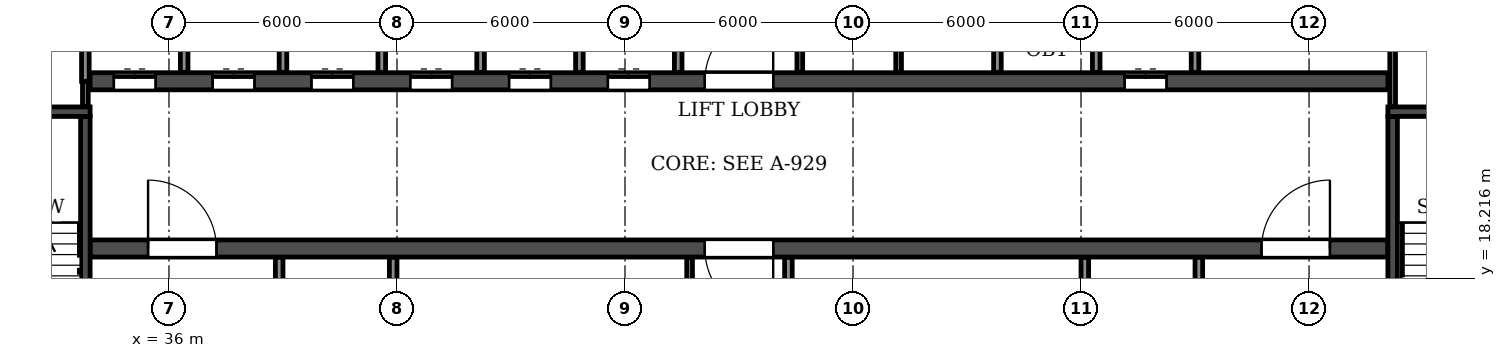
"""IFC4 building model, lengths in metres.
Left out: names, types, materials, properties, quantities, classifications, styles, units other than length and angle.
Written with IfcOpenShell. Run it as: python <this file> out.ifc"""

import sys

from ifc_helpers import new_model, si_unit, direction, frame, frame_2d, origin, place, context, subcontext, project, spatial, rectangle, extrude, element, fill, save


model = new_model("IFC4")
c1 = context("Model", 3, precision=1e-05, world=origin(), true_north=direction((0.0, 1.0)))
c2 = subcontext(c1, "Body", "Model", "MODEL_VIEW")
j1 = project(units=[si_unit("LENGTHUNIT", "METRE"), si_unit("PLANEANGLEUNIT", "RADIAN")], contexts=[c1])
p1 = place(None, origin())
s1 = spatial("IfcSite", under=j1, at=p1, CompositionType="ELEMENT")
p2 = place(p1, origin())
s2 = spatial("IfcBuilding", under=s1, at=p2, CompositionType="ELEMENT")
p3 = place(p2, frame((0.0, 0.0, 158.7)))
s3 = spatial("IfcBuildingStorey", under=s2, at=p3, CompositionType="ELEMENT", Elevation=158.7)
p4 = place(p3, frame((33.925, 19.0, 0.0), z_axis=(0.0, 0.0, 1.0), x_axis=(1.0, 0.0, 0.0)))
e1 = element("IfcWall", 1, at=p4, inside=s3, PredefinedType="SOLIDWALL", context=c2, shape_type="SweptSolid", body=[
    extrude(rectangle(XDim=34.15, YDim=0.45, at=frame_2d((17.075, 0.0))), origin(), (0.0, 0.0, 1.0), 3.07),
])
p5 = place(p4, frame((16.175, 0.0, 0.0)))
e2 = element("IfcOpeningElement", 2, at=p5, cuts=e1, PredefinedType="OPENING", context=c2, shape_type="SweptSolid", body=[
    extrude(rectangle(XDim=1.8, YDim=2.1, at=frame_2d((0.9, 1.05))), frame((0.0, 0.235, 0.0), z_axis=(0.0, -1.0, 0.0), x_axis=(1.0, 0.0, 0.0)), (0.0, 0.0, 1.0), 0.47),
])
p6 = place(p4, frame((1.525, 0.0, 0.0)))
e3 = element("IfcOpeningElement", 3, at=p6, cuts=e1, PredefinedType="OPENING", context=c2, shape_type="SweptSolid", body=[
    extrude(rectangle(XDim=1.8, YDim=2.1, at=frame_2d((0.9, 1.05))), frame((0.0, 0.235, 0.0), z_axis=(0.0, -1.0, 0.0), x_axis=(1.0, 0.0, 0.0)), (0.0, 0.0, 1.0), 0.47),
])
p7 = place(p4, frame((30.825, 0.0, 0.0)))
e4 = element("IfcOpeningElement", 4, at=p7, cuts=e1, PredefinedType="OPENING", context=c2, shape_type="SweptSolid", body=[
    extrude(rectangle(XDim=1.8, YDim=2.1, at=frame_2d((0.9, 1.05))), frame((0.0, 0.235, 0.0), z_axis=(0.0, -1.0, 0.0), x_axis=(1.0, 0.0, 0.0)), (0.0, 0.0, 1.0), 0.47),
])
p8 = place(p3, frame((33.925, 23.4, 0.0), z_axis=(0.0, 0.0, 1.0), x_axis=(1.0, 0.0, 0.0)))
e5 = element("IfcWall", 5, at=p8, inside=s3, PredefinedType="SOLIDWALL", context=c2, shape_type="SweptSolid", body=[
    extrude(rectangle(XDim=34.15, YDim=0.45, at=frame_2d((17.075, 0.0))), origin(), (0.0, 0.0, 1.0), 3.07),
])
p9 = place(p8, frame((16.175, 0.0, 0.0)))
e6 = element("IfcOpeningElement", 6, at=p9, cuts=e5, PredefinedType="OPENING", context=c2, shape_type="SweptSolid", body=[
    extrude(rectangle(XDim=1.8, YDim=2.1, at=frame_2d((0.9, 1.05))), frame((0.0, 0.235, 0.0), z_axis=(0.0, -1.0, 0.0), x_axis=(1.0, 0.0, 0.0)), (0.0, 0.0, 1.0), 0.47),
])
p10 = place(p8, frame((0.625, 0.0, 0.0)))
e7 = element("IfcOpeningElement", 7, at=p10, cuts=e5, PredefinedType="OPENING", context=c2, shape_type="SweptSolid", body=[
    extrude(rectangle(XDim=1.1, YDim=2.1, at=frame_2d((0.55, 1.05))), frame((0.0, 0.235, 0.0), z_axis=(0.0, -1.0, 0.0), x_axis=(1.0, 0.0, 0.0)), (0.0, 0.0, 1.0), 0.47),
])
p11 = place(p8, frame((3.225, 0.0, 0.0)))
e8 = element("IfcOpeningElement", 8, at=p11, cuts=e5, PredefinedType="OPENING", context=c2, shape_type="SweptSolid", body=[
    extrude(rectangle(XDim=1.1, YDim=2.1, at=frame_2d((0.55, 1.05))), frame((0.0, 0.235, 0.0), z_axis=(0.0, -1.0, 0.0), x_axis=(1.0, 0.0, 0.0)), (0.0, 0.0, 1.0), 0.47),
])
p12 = place(p8, frame((5.825, 0.0, 0.0)))
e9 = element("IfcOpeningElement", 9, at=p12, cuts=e5, PredefinedType="OPENING", context=c2, shape_type="SweptSolid", body=[
    extrude(rectangle(XDim=1.1, YDim=2.1, at=frame_2d((0.55, 1.05))), frame((0.0, 0.235, 0.0), z_axis=(0.0, -1.0, 0.0), x_axis=(1.0, 0.0, 0.0)), (0.0, 0.0, 1.0), 0.47),
])
p13 = place(p8, frame((8.425, 0.0, 0.0)))
e10 = element("IfcOpeningElement", 10, at=p13, cuts=e5, PredefinedType="OPENING", context=c2, shape_type="SweptSolid", body=[
    extrude(rectangle(XDim=1.1, YDim=2.1, at=frame_2d((0.55, 1.05))), frame((0.0, 0.235, 0.0), z_axis=(0.0, -1.0, 0.0), x_axis=(1.0, 0.0, 0.0)), (0.0, 0.0, 1.0), 0.47),
])
p14 = place(p8, frame((11.025, 0.0, 0.0)))
e11 = element("IfcOpeningElement", 11, at=p14, cuts=e5, PredefinedType="OPENING", context=c2, shape_type="SweptSolid", body=[
    extrude(rectangle(XDim=1.1, YDim=2.1, at=frame_2d((0.55, 1.05))), frame((0.0, 0.235, 0.0), z_axis=(0.0, -1.0, 0.0), x_axis=(1.0, 0.0, 0.0)), (0.0, 0.0, 1.0), 0.47),
])
p15 = place(p8, frame((13.625, 0.0, 0.0)))
e12 = element("IfcOpeningElement", 12, at=p15, cuts=e5, PredefinedType="OPENING", context=c2, shape_type="SweptSolid", body=[
    extrude(rectangle(XDim=1.1, YDim=2.1, at=frame_2d((0.55, 1.05))), frame((0.0, 0.235, 0.0), z_axis=(0.0, -1.0, 0.0), x_axis=(1.0, 0.0, 0.0)), (0.0, 0.0, 1.0), 0.47),
])
p16 = place(p8, frame((27.225, 0.0, 0.0)))
e13 = element("IfcOpeningElement", 13, at=p16, cuts=e5, PredefinedType="OPENING", context=c2, shape_type="SweptSolid", body=[
    extrude(rectangle(XDim=1.1, YDim=2.1, at=frame_2d((0.55, 1.05))), frame((0.0, 0.235, 0.0), z_axis=(0.0, -1.0, 0.0), x_axis=(1.0, 0.0, 0.0)), (0.0, 0.0, 1.0), 0.47),
])
p17 = place(p3, frame((33.8, 14.825, 0.0), z_axis=(0.0, 0.0, 1.0), x_axis=(0.0, 1.0, 0.0)))
e14 = element("IfcWall", 14, at=p17, inside=s3, PredefinedType="SOLIDWALL", context=c2, shape_type="SweptSolid", body=[
    extrude(rectangle(XDim=7.65, YDim=0.25, at=frame_2d((3.825, 0.0))), origin(), (0.0, 0.0, 1.0), 3.07),
])
p18 = place(p17, frame((0.475, 0.0, 0.0)))
e15 = element("IfcOpeningElement", 15, at=p18, cuts=e14, PredefinedType="OPENING", context=c2, shape_type="SweptSolid", body=[
    extrude(rectangle(XDim=1.0, YDim=2.1, at=frame_2d((0.5, 1.05))), frame((0.0, 0.135, 0.0), z_axis=(0.0, -1.0, 0.0), x_axis=(1.0, 0.0, 0.0)), (0.0, 0.0, 1.0), 0.27),
])
p19 = place(p3, frame((29.875, 22.6, 0.0), z_axis=(0.0, 0.0, 1.0), x_axis=(1.0, 0.0, 0.0)))
e16 = element("IfcWall", 16, at=p19, inside=s3, PredefinedType="SOLIDWALL", context=c2, shape_type="SweptSolid", body=[
    extrude(rectangle(XDim=4.05, YDim=0.25, at=frame_2d((2.025, 0.0))), origin(), (0.0, 0.0, 1.0), 3.07),
])
p20 = place(p3, frame((68.2, 14.825, 0.0), z_axis=(0.0, 0.0, 1.0), x_axis=(0.0, 1.0, 0.0)))
e17 = element("IfcWall", 17, at=p20, inside=s3, PredefinedType="SOLIDWALL", context=c2, shape_type="SweptSolid", body=[
    extrude(rectangle(XDim=7.65, YDim=0.25, at=frame_2d((3.825, 0.0))), origin(), (0.0, 0.0, 1.0), 3.07),
])
p21 = place(p20, frame((0.475, 0.0, 0.0)))
e18 = element("IfcOpeningElement", 18, at=p21, cuts=e17, PredefinedType="OPENING", context=c2, shape_type="SweptSolid", body=[
    extrude(rectangle(XDim=1.0, YDim=2.1, at=frame_2d((0.5, 1.05))), frame((0.0, 0.135, 0.0), z_axis=(0.0, -1.0, 0.0), x_axis=(1.0, 0.0, 0.0)), (0.0, 0.0, 1.0), 0.27),
])
p22 = place(p3, frame((68.075, 22.6, 0.0), z_axis=(0.0, 0.0, 1.0), x_axis=(1.0, 0.0, 0.0)))
e19 = element("IfcWall", 19, at=p22, inside=s3, PredefinedType="SOLIDWALL", context=c2, shape_type="SweptSolid", body=[
    extrude(rectangle(XDim=4.05, YDim=0.25, at=frame_2d((2.025, 0.0))), origin(), (0.0, 0.0, 1.0), 3.07),
])
for number, where, z_axis, x_axis in (
    (20, (49.7, 14.835, 0.0), (0.0, 0.0, 1.0), (0.0, 1.0, 0.0)),
    (21, (52.6, 23.635, 0.0), (0.0, 0.0, 1.0), (0.0, 1.0, 0.0)),
    (22, (55.2, 23.635, 0.0), (0.0, 0.0, 1.0), (0.0, 1.0, 0.0)),
):
    element("IfcWall", number, at=place(p3, frame(where, z_axis=z_axis, x_axis=x_axis)), inside=s3, PredefinedType="PARTITIONING", context=c2, shape_type="SweptSolid", body=[
        extrude(rectangle(XDim=3.93, YDim=0.15, at=frame_2d((1.965, 0.0))), origin(), (0.0, 0.0, 1.0), 3.07),
    ])
p23 = place(p3, frame((52.3, 14.835, 0.0), z_axis=(0.0, 0.0, 1.0), x_axis=(0.0, 1.0, 0.0)))
e23 = element("IfcWall", 23, at=p23, inside=s3, PredefinedType="PARTITIONING", context=c2, shape_type="SweptSolid", body=[
    extrude(rectangle(XDim=3.93, YDim=0.2, at=frame_2d((1.965, 0.0))), origin(), (0.0, 0.0, 1.0), 3.07),
])
p24 = place(p3, frame((33.8, 22.735, 0.0), z_axis=(0.0, 0.0, 1.0), x_axis=(0.0, 1.0, 0.0)))
e24 = element("IfcWall", 24, at=p24, inside=s3, PredefinedType="PARTITIONING", context=c2, shape_type="SweptSolid", body=[
    extrude(rectangle(XDim=0.665, YDim=0.15, at=frame_2d((0.333, 0.0))), origin(), (0.0, 0.0, 1.0), 3.07),
])
p25 = place(p3, frame((68.2, 22.735, 0.0), z_axis=(0.0, 0.0, 1.0), x_axis=(0.0, 1.0, 0.0)))
e25 = element("IfcWall", 25, at=p25, inside=s3, PredefinedType="PARTITIONING", context=c2, shape_type="SweptSolid", body=[
    extrude(rectangle(XDim=4.83, YDim=0.15, at=frame_2d((2.415, 0.0))), origin(), (0.0, 0.0, 1.0), 3.07),
])
p26 = place(p3, frame((33.8, 23.4, 0.0), z_axis=(0.0, 0.0, 1.0), x_axis=(0.0, 1.0, 0.0)))
e26 = element("IfcWall", 26, at=p26, inside=s3, PredefinedType="PARTITIONING", context=c2, shape_type="SweptSolid", body=[
    extrude(rectangle(XDim=2.7, YDim=0.2, at=frame_2d((1.35, 0.0))), origin(), (0.0, 0.0, 1.0), 3.07),
])
p27 = place(p3, frame((36.4, 23.635, 0.0), z_axis=(0.0, 0.0, 1.0), x_axis=(0.0, 1.0, 0.0)))
e27 = element("IfcWall", 27, at=p27, inside=s3, PredefinedType="PARTITIONING", context=c2, shape_type="SweptSolid", body=[
    extrude(rectangle(XDim=2.465, YDim=0.2, at=frame_2d((1.232, 0.0))), origin(), (0.0, 0.0, 1.0), 3.07),
])
p28 = place(p3, frame((38.9, 14.835, 0.0), z_axis=(0.0, 0.0, 1.0), x_axis=(0.0, 1.0, 0.0)))
e28 = element("IfcWall", 28, at=p28, inside=s3, PredefinedType="PARTITIONING", context=c2, shape_type="SweptSolid", body=[
    extrude(rectangle(XDim=3.93, YDim=0.2, at=frame_2d((1.965, 0.0))), origin(), (0.0, 0.0, 1.0), 3.07),
])
p29 = place(p28, frame((1.415, 0.0, 0.0)))
e29 = element("IfcOpeningElement", 29, at=p29, cuts=e28, PredefinedType="OPENING", context=c2, shape_type="SweptSolid", body=[
    extrude(rectangle(XDim=1.1, YDim=2.1, at=frame_2d((0.55, 1.05))), frame((0.0, 0.11, 0.0), z_axis=(0.0, -1.0, 0.0), x_axis=(1.0, 0.0, 0.0)), (0.0, 0.0, 1.0), 0.22),
])
for number, where, z_axis, x_axis in (
    (30, (39.0, 23.635, 0.0), (0.0, 0.0, 1.0), (0.0, 1.0, 0.0)),
    (31, (41.6, 23.635, 0.0), (0.0, 0.0, 1.0), (0.0, 1.0, 0.0)),
):
    element("IfcWall", number, at=place(p3, frame(where, z_axis=z_axis, x_axis=x_axis)), inside=s3, PredefinedType="PARTITIONING", context=c2, shape_type="SweptSolid", body=[
        extrude(rectangle(XDim=2.465, YDim=0.2, at=frame_2d((1.232, 0.0))), origin(), (0.0, 0.0, 1.0), 3.07),
    ])
for number, where, z_axis, x_axis in (
    (32, (41.9, 14.835, 0.0), (0.0, 0.0, 1.0), (0.0, 1.0, 0.0)),
    (33, (44.2, 23.635, 0.0), (0.0, 0.0, 1.0), (0.0, 1.0, 0.0)),
    (34, (46.8, 23.635, 0.0), (0.0, 0.0, 1.0), (0.0, 1.0, 0.0)),
):
    element("IfcWall", number, at=place(p3, frame(where, z_axis=z_axis, x_axis=x_axis)), inside=s3, PredefinedType="PARTITIONING", context=c2, shape_type="SweptSolid", body=[
        extrude(rectangle(XDim=3.93, YDim=0.2, at=frame_2d((1.965, 0.0))), origin(), (0.0, 0.0, 1.0), 3.07),
    ])
for number, where, z_axis, x_axis in (
    (35, (49.4, 23.635, 0.0), (0.0, 0.0, 1.0), (0.0, 1.0, 0.0)),
    (36, (57.8, 23.635, 0.0), (0.0, 0.0, 1.0), (0.0, 1.0, 0.0)),
):
    element("IfcWall", number, at=place(p3, frame(where, z_axis=z_axis, x_axis=x_axis)), inside=s3, PredefinedType="PARTITIONING", context=c2, shape_type="SweptSolid", body=[
        extrude(rectangle(XDim=2.465, YDim=0.2, at=frame_2d((1.232, 0.0))), origin(), (0.0, 0.0, 1.0), 3.07),
    ])
p30 = place(p3, frame((60.1, 14.835, 0.0), z_axis=(0.0, 0.0, 1.0), x_axis=(0.0, 1.0, 0.0)))
e37 = element("IfcWall", 37, at=p30, inside=s3, PredefinedType="PARTITIONING", context=c2, shape_type="SweptSolid", body=[
    extrude(rectangle(XDim=3.93, YDim=0.2, at=frame_2d((1.965, 0.0))), origin(), (0.0, 0.0, 1.0), 3.07),
])
for number, where, z_axis, x_axis in (
    (38, (60.4, 23.635, 0.0), (0.0, 0.0, 1.0), (0.0, 1.0, 0.0)),
    (39, (63.0, 23.635, 0.0), (0.0, 0.0, 1.0), (0.0, 1.0, 0.0)),
):
    element("IfcWall", number, at=place(p3, frame(where, z_axis=z_axis, x_axis=x_axis)), inside=s3, PredefinedType="PARTITIONING", context=c2, shape_type="SweptSolid", body=[
        extrude(rectangle(XDim=2.465, YDim=0.2, at=frame_2d((1.232, 0.0))), origin(), (0.0, 0.0, 1.0), 3.07),
    ])
p31 = place(p3, frame((63.1, 14.835, 0.0), z_axis=(0.0, 0.0, 1.0), x_axis=(0.0, 1.0, 0.0)))
e40 = element("IfcWall", 40, at=p31, inside=s3, PredefinedType="PARTITIONING", context=c2, shape_type="SweptSolid", body=[
    extrude(rectangle(XDim=3.93, YDim=0.2, at=frame_2d((1.965, 0.0))), origin(), (0.0, 0.0, 1.0), 3.07),
])
p32 = place(p31, frame((1.415, 0.0, 0.0)))
e41 = element("IfcOpeningElement", 41, at=p32, cuts=e40, PredefinedType="OPENING", context=c2, shape_type="SweptSolid", body=[
    extrude(rectangle(XDim=1.1, YDim=2.1, at=frame_2d((0.55, 1.05))), frame((0.0, 0.11, 0.0), z_axis=(0.0, -1.0, 0.0), x_axis=(1.0, 0.0, 0.0)), (0.0, 0.0, 1.0), 0.22),
])
p33 = place(p9, origin())
e42 = element("IfcDoor", 42, at=p33, inside=s3, OperationType="DOUBLE_DOOR_SINGLE_SWING", PredefinedType="DOOR", context=c2, shape_type="SweptSolid", body=[
    extrude(rectangle(XDim=1.8, YDim=2.1, at=frame_2d((0.9, 1.05))), frame((0.0, 0.025, 0.0), z_axis=(0.0, -1.0, 0.0), x_axis=(1.0, 0.0, 0.0)), (0.0, 0.0, 1.0), 0.05),
])
fill(e6, e42)
p34 = place(p5, frame((1.8, 0.0, 0.0), z_axis=(0.0, 0.0, 1.0), x_axis=(-1.0, 0.0, 0.0)))
e43 = element("IfcDoor", 43, at=p34, inside=s3, OperationType="DOUBLE_DOOR_SINGLE_SWING", PredefinedType="DOOR", context=c2, shape_type="SweptSolid", body=[
    extrude(rectangle(XDim=1.8, YDim=2.1, at=frame_2d((0.9, 1.05))), frame((0.0, 0.025, 0.0), z_axis=(0.0, -1.0, 0.0), x_axis=(1.0, 0.0, 0.0)), (0.0, 0.0, 1.0), 0.05),
])
fill(e2, e43)
p35 = place(p10, origin())
e44 = element("IfcDoor", 44, at=p35, inside=s3, OperationType="DOUBLE_DOOR_SLIDING", PredefinedType="DOOR", context=c2, shape_type="SweptSolid", body=[
    extrude(rectangle(XDim=1.1, YDim=2.1, at=frame_2d((0.55, 1.05))), frame((0.0, 0.025, 0.0), z_axis=(0.0, -1.0, 0.0), x_axis=(1.0, 0.0, 0.0)), (0.0, 0.0, 1.0), 0.05),
])
fill(e7, e44)
p36 = place(p6, origin())
e45 = element("IfcDoor", 45, at=p36, inside=s3, OperationType="DOUBLE_DOOR_SINGLE_SWING", PredefinedType="DOOR", context=c2, shape_type="SweptSolid", body=[
    extrude(rectangle(XDim=1.8, YDim=2.1, at=frame_2d((0.9, 1.05))), frame((0.0, 0.025, 0.0), z_axis=(0.0, -1.0, 0.0), x_axis=(1.0, 0.0, 0.0)), (0.0, 0.0, 1.0), 0.05),
])
fill(e3, e45)
p37 = place(p11, origin())
e46 = element("IfcDoor", 46, at=p37, inside=s3, OperationType="DOUBLE_DOOR_SLIDING", PredefinedType="DOOR", context=c2, shape_type="SweptSolid", body=[
    extrude(rectangle(XDim=1.1, YDim=2.1, at=frame_2d((0.55, 1.05))), frame((0.0, 0.025, 0.0), z_axis=(0.0, -1.0, 0.0), x_axis=(1.0, 0.0, 0.0)), (0.0, 0.0, 1.0), 0.05),
])
fill(e8, e46)
p38 = place(p12, origin())
e47 = element("IfcDoor", 47, at=p38, inside=s3, OperationType="DOUBLE_DOOR_SLIDING", PredefinedType="DOOR", context=c2, shape_type="SweptSolid", body=[
    extrude(rectangle(XDim=1.1, YDim=2.1, at=frame_2d((0.55, 1.05))), frame((0.0, 0.025, 0.0), z_axis=(0.0, -1.0, 0.0), x_axis=(1.0, 0.0, 0.0)), (0.0, 0.0, 1.0), 0.05),
])
fill(e9, e47)
p39 = place(p13, origin())
e48 = element("IfcDoor", 48, at=p39, inside=s3, OperationType="DOUBLE_DOOR_SLIDING", PredefinedType="DOOR", context=c2, shape_type="SweptSolid", body=[
    extrude(rectangle(XDim=1.1, YDim=2.1, at=frame_2d((0.55, 1.05))), frame((0.0, 0.025, 0.0), z_axis=(0.0, -1.0, 0.0), x_axis=(1.0, 0.0, 0.0)), (0.0, 0.0, 1.0), 0.05),
])
fill(e10, e48)
p40 = place(p14, origin())
e49 = element("IfcDoor", 49, at=p40, inside=s3, OperationType="DOUBLE_DOOR_SLIDING", PredefinedType="DOOR", context=c2, shape_type="SweptSolid", body=[
    extrude(rectangle(XDim=1.1, YDim=2.1, at=frame_2d((0.55, 1.05))), frame((0.0, 0.025, 0.0), z_axis=(0.0, -1.0, 0.0), x_axis=(1.0, 0.0, 0.0)), (0.0, 0.0, 1.0), 0.05),
])
fill(e11, e49)
p41 = place(p15, origin())
e50 = element("IfcDoor", 50, at=p41, inside=s3, OperationType="DOUBLE_DOOR_SLIDING", PredefinedType="DOOR", context=c2, shape_type="SweptSolid", body=[
    extrude(rectangle(XDim=1.1, YDim=2.1, at=frame_2d((0.55, 1.05))), frame((0.0, 0.025, 0.0), z_axis=(0.0, -1.0, 0.0), x_axis=(1.0, 0.0, 0.0)), (0.0, 0.0, 1.0), 0.05),
])
fill(e12, e50)
p42 = place(p16, origin())
e51 = element("IfcDoor", 51, at=p42, inside=s3, OperationType="DOUBLE_DOOR_SLIDING", PredefinedType="DOOR", context=c2, shape_type="SweptSolid", body=[
    extrude(rectangle(XDim=1.1, YDim=2.1, at=frame_2d((0.55, 1.05))), frame((0.0, 0.025, 0.0), z_axis=(0.0, -1.0, 0.0), x_axis=(1.0, 0.0, 0.0)), (0.0, 0.0, 1.0), 0.05),
])
fill(e13, e51)
p43 = place(p7, origin())
e52 = element("IfcDoor", 52, at=p43, inside=s3, OperationType="DOUBLE_DOOR_SINGLE_SWING", PredefinedType="DOOR", context=c2, shape_type="SweptSolid", body=[
    extrude(rectangle(XDim=1.8, YDim=2.1, at=frame_2d((0.9, 1.05))), frame((0.0, 0.025, 0.0), z_axis=(0.0, -1.0, 0.0), x_axis=(1.0, 0.0, 0.0)), (0.0, 0.0, 1.0), 0.05),
])
fill(e4, e52)
save(model, sys.argv[1])
